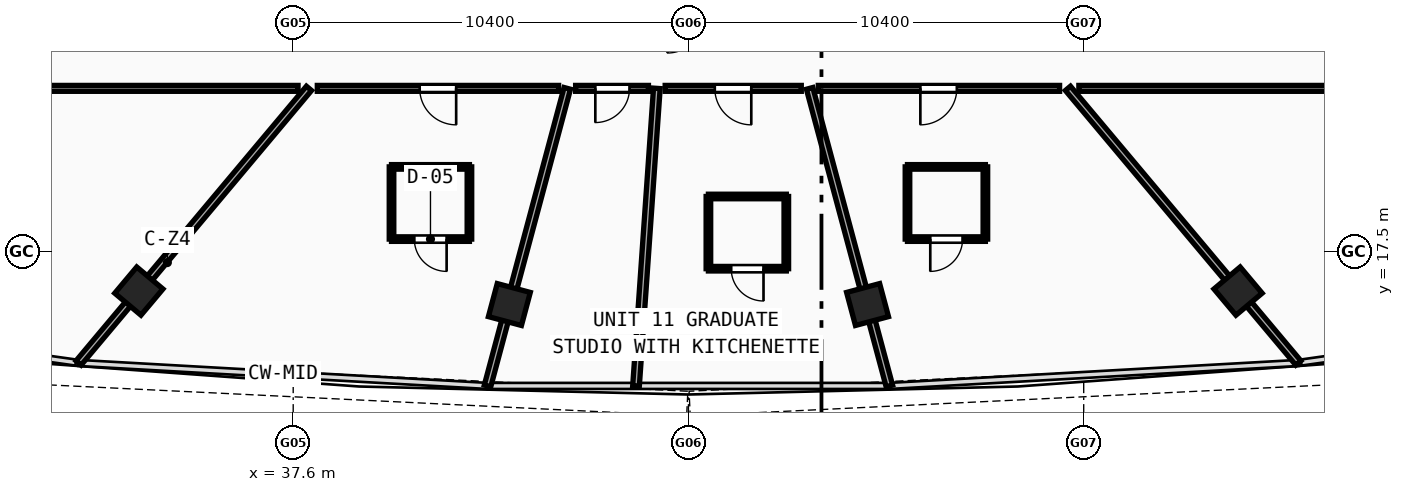
"""IFC4 building model, lengths in metres.
Left out: names, types, materials, properties, quantities, classifications, styles, units other than length and angle.
Written with IfcOpenShell. Run it as: python <this file> out.ifc"""

import sys

from ifc_helpers import new_model, si_unit, direction, frame, frame_2d, origin, origin_with_axes, origin_2d, place, context, subcontext, project, spatial, rectangle, hollow_rectangle, extrude, source, transform, mapped, element, fill, save


model = new_model("IFC4")
c1 = context("Model", 3, precision=1e-05, world=origin(), true_north=direction((0.0, 1.0)))
c2 = subcontext(c1, "Body", "Model", "MODEL_VIEW")
j1 = project(units=[si_unit("LENGTHUNIT", "METRE"), si_unit("PLANEANGLEUNIT", "RADIAN")], contexts=[c1])
p1 = place(None, origin())
s1 = spatial("IfcSite", under=j1, at=p1, CompositionType="ELEMENT")
p2 = place(p1, origin())
s2 = spatial("IfcBuilding", under=s1, at=p2, CompositionType="ELEMENT")
p3 = place(p2, frame((0.0, 0.0, 188.56)))
s3 = spatial("IfcBuildingStorey", under=s2, at=p3, CompositionType="ELEMENT", Elevation=188.56)
m1 = source(origin(), c2, "Body", "SweptSolid", [
    extrude(hollow_rectangle(XDim=0.9, YDim=0.9, WallThickness=0.036, at=origin_2d()), origin(), (0.0, 0.0, 1.0), 3.8),
])
for number, where, z_axis, x_axis in (
    (1, (33.539, 16.466, -0.26), (0.0, 0.0, 1.0), (0.766, -0.643, 0.0)),
    (2, (43.288, 16.112, -0.26), (0.0, 0.0, 1.0), (0.966, -0.259, 0.0)),
    (3, (52.713, 16.112, -0.26), (0.0, 0.0, 1.0), (0.966, 0.259, 0.0)),
    (4, (62.461, 16.466, -0.26), (0.0, 0.0, 1.0), (0.766, 0.643, 0.0)),
):
    element("IfcColumn", number, at=place(p3, frame(where, z_axis=z_axis, x_axis=x_axis)), inside=s3, PredefinedType="COLUMN", context=c2, shape_type="MappedRepresentation", body=[
        mapped(m1, transform((0.0, 0.0, 0.0), scale=1.0)),
    ])
p4 = place(p3, frame((38.015, 21.8, 0.0), z_axis=(0.0, 0.0, 1.0), x_axis=(-0.642777943688, -0.766052553751, 0.0)))
e5 = element("IfcWall", 5, at=p4, inside=s3, PredefinedType="PARTITIONING", context=c2, shape_type="SweptSolid", body=[
    extrude(rectangle(XDim=9.431, YDim=0.175, at=frame_2d((4.715, 0.0))), origin(), (0.0, 0.0, 1.0), 2.89),
])
p5 = place(p3, frame((44.811, 21.8, 0.0), z_axis=(0.0, 0.0, 1.0), x_axis=(-0.258815374981, -0.965926809688, 0.0)))
e6 = element("IfcWall", 6, at=p5, inside=s3, PredefinedType="PARTITIONING", context=c2, shape_type="SweptSolid", body=[
    extrude(rectangle(XDim=8.106, YDim=0.175, at=frame_2d((4.053, 0.0))), origin(), (0.0, 0.0, 1.0), 2.89),
])
p6 = place(p3, frame((47.168, 21.8, 0.0), z_axis=(0.0, 0.0, 1.0), x_axis=(-0.069770314737, -0.997563082307, 0.0)))
e7 = element("IfcWall", 7, at=p6, inside=s3, PredefinedType="PARTITIONING", context=c2, shape_type="SweptSolid", body=[
    extrude(rectangle(XDim=7.849, YDim=0.175, at=frame_2d((3.924, 0.0))), origin(), (0.0, 0.0, 1.0), 2.89),
])
p7 = place(p3, frame((51.189, 21.8, 0.0), z_axis=(0.0, 0.0, 1.0), x_axis=(0.258815374981, -0.965926809688, 0.0)))
e8 = element("IfcWall", 8, at=p7, inside=s3, PredefinedType="PARTITIONING", context=c2, shape_type="SweptSolid", body=[
    extrude(rectangle(XDim=8.106, YDim=0.175, at=frame_2d((4.053, 0.0))), origin(), (0.0, 0.0, 1.0), 2.89),
])
p8 = place(p3, frame((57.985, 21.8, 0.0), z_axis=(0.0, 0.0, 1.0), x_axis=(0.642777943688, -0.766052553751, 0.0)))
e9 = element("IfcWall", 9, at=p8, inside=s3, PredefinedType="PARTITIONING", context=c2, shape_type="SweptSolid", body=[
    extrude(rectangle(XDim=9.431, YDim=0.175, at=frame_2d((4.715, 0.0))), origin(), (0.0, 0.0, 1.0), 2.89),
])
p9 = place(p3, frame((66.4, 21.8, 0.0), z_axis=(0.0, 0.0, 1.0), x_axis=(-1.0, 0.0, 0.0)))
e10 = element("IfcWall", 10, at=p9, inside=s3, PredefinedType="PARTITIONING", context=c2, shape_type="SweptSolid", body=[
    extrude(rectangle(XDim=8.127, YDim=0.155, at=frame_2d((4.064, 0.0))), origin(), (0.0, 0.0, 1.0), 3.14),
])
p10 = place(p3, frame((57.765, 21.8, 0.0), z_axis=(0.0, 0.0, 1.0), x_axis=(-1.0, 0.0, 0.0)))
e11 = element("IfcWall", 11, at=p10, inside=s3, PredefinedType="PARTITIONING", context=c2, shape_type="SweptSolid", body=[
    extrude(rectangle(XDim=6.349, YDim=0.155, at=frame_2d((3.174, 0.0))), origin(), (0.0, 0.0, 1.0), 2.89),
])
p11 = place(p10, frame((2.703, 0.0, 0.0)))
e12 = element("IfcOpeningElement", 12, at=p11, cuts=e11, PredefinedType="OPENING", context=c2, shape_type="SweptSolid", body=[
    extrude(rectangle(XDim=0.96, YDim=2.12, at=frame_2d((0.48, 1.06))), frame((0.0, 0.087, 0.0), z_axis=(0.0, -1.0, 0.0), x_axis=(1.0, 0.0, 0.0)), (0.0, 0.0, 1.0), 0.175),
])
p12 = place(p3, frame((50.969, 21.8, 0.0), z_axis=(0.0, 0.0, 1.0), x_axis=(-1.0, 0.0, 0.0)))
e13 = element("IfcWall", 13, at=p12, inside=s3, PredefinedType="PARTITIONING", context=c2, shape_type="SweptSolid", body=[
    extrude(rectangle(XDim=3.581, YDim=0.155, at=frame_2d((1.791, 0.0))), origin(), (0.0, 0.0, 1.0), 3.54),
])
p13 = place(p12, frame((1.315, 0.0, 0.0)))
e14 = element("IfcOpeningElement", 14, at=p13, cuts=e13, PredefinedType="OPENING", context=c2, shape_type="SweptSolid", body=[
    extrude(rectangle(XDim=0.96, YDim=2.12, at=frame_2d((0.48, 1.06))), frame((0.0, 0.087, 0.0), z_axis=(0.0, -1.0, 0.0), x_axis=(1.0, 0.0, 0.0)), (0.0, 0.0, 1.0), 0.175),
])
p14 = place(p3, frame((46.948, 21.8, 0.0), z_axis=(0.0, 0.0, 1.0), x_axis=(-1.0, 0.0, 0.0)))
e15 = element("IfcWall", 15, at=p14, inside=s3, PredefinedType="PARTITIONING", context=c2, shape_type="SweptSolid", body=[
    extrude(rectangle(XDim=1.916, YDim=0.155, at=frame_2d((0.958, 0.0))), origin(), (0.0, 0.0, 1.0), 3.54),
])
p15 = place(p14, frame((0.498, 0.0, 0.0)))
e16 = element("IfcOpeningElement", 16, at=p15, cuts=e15, PredefinedType="OPENING", context=c2, shape_type="SweptSolid", body=[
    extrude(rectangle(XDim=0.9, YDim=2.08, at=frame_2d((0.45, 1.04))), frame((0.0, 0.087, 0.0), z_axis=(0.0, -1.0, 0.0), x_axis=(1.0, 0.0, 0.0)), (0.0, 0.0, 1.0), 0.175),
])
p16 = place(p3, frame((44.583, 21.8, 0.0), z_axis=(0.0, 0.0, 1.0), x_axis=(-1.0, 0.0, 0.0)))
e17 = element("IfcWall", 17, at=p16, inside=s3, PredefinedType="PARTITIONING", context=c2, shape_type="SweptSolid", body=[
    extrude(rectangle(XDim=6.349, YDim=0.155, at=frame_2d((3.174, 0.0))), origin(), (0.0, 0.0, 1.0), 2.89),
])
p17 = place(p16, frame((2.696, 0.0, 0.0)))
e18 = element("IfcOpeningElement", 18, at=p17, cuts=e17, PredefinedType="OPENING", context=c2, shape_type="SweptSolid", body=[
    extrude(rectangle(XDim=0.96, YDim=2.12, at=frame_2d((0.48, 1.06))), frame((0.0, 0.087, 0.0), z_axis=(0.0, -1.0, 0.0), x_axis=(1.0, 0.0, 0.0)), (0.0, 0.0, 1.0), 0.175),
])
p18 = place(p3, frame((37.728, 21.8, 0.0), z_axis=(0.0, 0.0, 1.0), x_axis=(-1.0, 0.0, 0.0)))
e19 = element("IfcWall", 19, at=p18, inside=s3, PredefinedType="PARTITIONING", context=c2, shape_type="SweptSolid", body=[
    extrude(rectangle(XDim=8.127, YDim=0.155, at=frame_2d((4.064, 0.0))), origin(), (0.0, 0.0, 1.0), 3.14),
])
p19 = place(p3, frame((40.187, 17.834, 0.0), z_axis=(0.0, 0.0, 1.0), x_axis=(1.0, 0.0, 0.0)))
e20 = element("IfcWall", 20, at=p19, inside=s3, PredefinedType="PARTITIONING", context=c2, shape_type="SweptSolid", body=[
    extrude(rectangle(XDim=2.05, YDim=0.12, at=frame_2d((1.025, 0.0))), origin(), (0.0, 0.0, 1.0), 3.54),
])
p20 = place(p19, frame((0.6, 0.0, 0.0)))
e21 = element("IfcOpeningElement", 21, at=p20, cuts=e20, PredefinedType="OPENING", context=c2, shape_type="SweptSolid", body=[
    extrude(rectangle(XDim=0.85, YDim=2.1, at=frame_2d((0.425, 1.05))), frame((0.0, 0.07, 0.0), z_axis=(0.0, -1.0, 0.0), x_axis=(1.0, 0.0, 0.0)), (0.0, 0.0, 1.0), 0.14),
])
p21 = place(p3, frame((42.237, 17.834, 0.0), z_axis=(0.0, 0.0, 1.0), x_axis=(0.0, 1.0, 0.0)))
e22 = element("IfcWall", 22, at=p21, inside=s3, PredefinedType="PARTITIONING", context=c2, shape_type="SweptSolid", body=[
    extrude(rectangle(XDim=1.9, YDim=0.12, at=frame_2d((0.95, 0.0))), origin(), (0.0, 0.0, 1.0), 3.14),
])
p22 = place(p3, frame((42.237, 19.734, 0.0), z_axis=(0.0, 0.0, 1.0), x_axis=(-1.0, 0.0, 0.0)))
e23 = element("IfcWall", 23, at=p22, inside=s3, PredefinedType="PARTITIONING", context=c2, shape_type="SweptSolid", body=[
    extrude(rectangle(XDim=2.05, YDim=0.12, at=frame_2d((1.025, 0.0))), origin(), (0.0, 0.0, 1.0), 3.14),
])
p23 = place(p3, frame((40.187, 19.734, 0.0), z_axis=(0.0, 0.0, 1.0), x_axis=(0.0, -1.0, 0.0)))
e24 = element("IfcWall", 24, at=p23, inside=s3, PredefinedType="PARTITIONING", context=c2, shape_type="SweptSolid", body=[
    extrude(rectangle(XDim=1.9, YDim=0.12, at=frame_2d((0.95, 0.0))), origin(), (0.0, 0.0, 1.0), 3.14),
])
p24 = place(p3, frame((48.525, 17.055, 0.0), z_axis=(0.0, 0.0, 1.0), x_axis=(1.0, 0.0, 0.0)))
e25 = element("IfcWall", 25, at=p24, inside=s3, PredefinedType="PARTITIONING", context=c2, shape_type="SweptSolid", body=[
    extrude(rectangle(XDim=2.05, YDim=0.12, at=frame_2d((1.025, 0.0))), origin(), (0.0, 0.0, 1.0), 3.54),
])
p25 = place(p24, frame((0.6, 0.0, 0.0)))
e26 = element("IfcOpeningElement", 26, at=p25, cuts=e25, PredefinedType="OPENING", context=c2, shape_type="SweptSolid", body=[
    extrude(rectangle(XDim=0.85, YDim=2.1, at=frame_2d((0.425, 1.05))), frame((0.0, 0.07, 0.0), z_axis=(0.0, -1.0, 0.0), x_axis=(1.0, 0.0, 0.0)), (0.0, 0.0, 1.0), 0.14),
])
p26 = place(p3, frame((50.575, 17.055, 0.0), z_axis=(0.0, 0.0, 1.0), x_axis=(0.0, 1.0, 0.0)))
e27 = element("IfcWall", 27, at=p26, inside=s3, PredefinedType="PARTITIONING", context=c2, shape_type="SweptSolid", body=[
    extrude(rectangle(XDim=1.9, YDim=0.12, at=frame_2d((0.95, 0.0))), origin(), (0.0, 0.0, 1.0), 3.54),
])
p27 = place(p3, frame((50.575, 18.955, 0.0), z_axis=(0.0, 0.0, 1.0), x_axis=(-1.0, 0.0, 0.0)))
e28 = element("IfcWall", 28, at=p27, inside=s3, PredefinedType="PARTITIONING", context=c2, shape_type="SweptSolid", body=[
    extrude(rectangle(XDim=2.05, YDim=0.12, at=frame_2d((1.025, 0.0))), origin(), (0.0, 0.0, 1.0), 3.54),
])
p28 = place(p3, frame((48.525, 18.955, 0.0), z_axis=(0.0, 0.0, 1.0), x_axis=(0.0, -1.0, 0.0)))
e29 = element("IfcWall", 29, at=p28, inside=s3, PredefinedType="PARTITIONING", context=c2, shape_type="SweptSolid", body=[
    extrude(rectangle(XDim=1.9, YDim=0.12, at=frame_2d((0.95, 0.0))), origin(), (0.0, 0.0, 1.0), 3.54),
])
p29 = place(p3, frame((53.763, 17.834, 0.0), z_axis=(0.0, 0.0, 1.0), x_axis=(1.0, 0.0, 0.0)))
e30 = element("IfcWall", 30, at=p29, inside=s3, PredefinedType="PARTITIONING", context=c2, shape_type="SweptSolid", body=[
    extrude(rectangle(XDim=2.05, YDim=0.12, at=frame_2d((1.025, 0.0))), origin(), (0.0, 0.0, 1.0), 3.54),
])
p30 = place(p29, frame((0.6, 0.0, 0.0)))
e31 = element("IfcOpeningElement", 31, at=p30, cuts=e30, PredefinedType="OPENING", context=c2, shape_type="SweptSolid", body=[
    extrude(rectangle(XDim=0.85, YDim=2.1, at=frame_2d((0.425, 1.05))), frame((0.0, 0.07, 0.0), z_axis=(0.0, -1.0, 0.0), x_axis=(1.0, 0.0, 0.0)), (0.0, 0.0, 1.0), 0.14),
])
p31 = place(p3, frame((55.813, 17.834, 0.0), z_axis=(0.0, 0.0, 1.0), x_axis=(0.0, 1.0, 0.0)))
e32 = element("IfcWall", 32, at=p31, inside=s3, PredefinedType="PARTITIONING", context=c2, shape_type="SweptSolid", body=[
    extrude(rectangle(XDim=1.9, YDim=0.12, at=frame_2d((0.95, 0.0))), origin(), (0.0, 0.0, 1.0), 3.14),
])
p32 = place(p3, frame((55.813, 19.734, 0.0), z_axis=(0.0, 0.0, 1.0), x_axis=(-1.0, 0.0, 0.0)))
e33 = element("IfcWall", 33, at=p32, inside=s3, PredefinedType="PARTITIONING", context=c2, shape_type="SweptSolid", body=[
    extrude(rectangle(XDim=2.05, YDim=0.12, at=frame_2d((1.025, 0.0))), origin(), (0.0, 0.0, 1.0), 3.14),
])
p33 = place(p3, frame((53.763, 19.734, 0.0), z_axis=(0.0, 0.0, 1.0), x_axis=(0.0, -1.0, 0.0)))
e34 = element("IfcWall", 34, at=p33, inside=s3, PredefinedType="PARTITIONING", context=c2, shape_type="SweptSolid", body=[
    extrude(rectangle(XDim=1.9, YDim=0.12, at=frame_2d((0.95, 0.0))), origin(), (0.0, 0.0, 1.0), 3.14),
])
m2 = source(origin(), c2, "Body", "SweptSolid", [
    extrude(rectangle(XDim=0.96, YDim=2.12, at=frame_2d((0.48, 1.06))), frame((0.0, 0.025, 0.0), z_axis=(0.0, -1.0, 0.0), x_axis=(1.0, 0.0, 0.0)), (0.0, 0.0, 1.0), 0.05),
])
p34 = place(p17, origin_with_axes())
e35 = element("IfcDoor", 35, at=p34, inside=s3, OperationType="SINGLE_SWING_LEFT", PredefinedType="DOOR", context=c2, shape_type="MappedRepresentation", body=[
    mapped(m2, transform((0.0, 0.0, 0.0), scale=1.0)),
])
fill(e18, e35)
m3 = source(origin(), c2, "Body", "SweptSolid", [
    extrude(rectangle(XDim=0.85, YDim=2.1, at=frame_2d((0.425, 1.05))), frame((0.0, 0.025, 0.0), z_axis=(0.0, -1.0, 0.0), x_axis=(1.0, 0.0, 0.0)), (0.0, 0.0, 1.0), 0.05),
])
p35 = place(p20, frame((0.85, 0.0, 0.0), z_axis=(0.0, 0.0, 1.0), x_axis=(-1.0, 0.0, 0.0)))
e36 = element("IfcDoor", 36, at=p35, inside=s3, OperationType="SINGLE_SWING_LEFT", PredefinedType="DOOR", context=c2, shape_type="MappedRepresentation", body=[
    mapped(m3, transform((0.0, 0.0, 0.0), scale=1.0)),
])
fill(e21, e36)
m4 = source(origin(), c2, "Body", "SweptSolid", [
    extrude(rectangle(XDim=0.9, YDim=2.08, at=frame_2d((0.45, 1.04))), frame((0.0, 0.025, 0.0), z_axis=(0.0, -1.0, 0.0), x_axis=(1.0, 0.0, 0.0)), (0.0, 0.0, 1.0), 0.05),
])
p36 = place(p15, origin_with_axes())
e37 = element("IfcDoor", 37, at=p36, inside=s3, OperationType="SINGLE_SWING_RIGHT", PredefinedType="DOOR", context=c2, shape_type="MappedRepresentation", body=[
    mapped(m4, transform((0.0, 0.0, 0.0), scale=1.0)),
])
fill(e16, e37)
p37 = place(p13, origin_with_axes())
e38 = element("IfcDoor", 38, at=p37, inside=s3, OperationType="SINGLE_SWING_LEFT", PredefinedType="DOOR", context=c2, shape_type="MappedRepresentation", body=[
    mapped(m2, transform((0.0, 0.0, 0.0), scale=1.0)),
])
fill(e14, e38)
p38 = place(p25, frame((0.85, 0.0, 0.0), z_axis=(0.0, 0.0, 1.0), x_axis=(-1.0, 0.0, 0.0)))
e39 = element("IfcDoor", 39, at=p38, inside=s3, OperationType="SINGLE_SWING_LEFT", PredefinedType="DOOR", context=c2, shape_type="MappedRepresentation", body=[
    mapped(m3, transform((0.0, 0.0, 0.0), scale=1.0)),
])
fill(e26, e39)
p39 = place(p11, origin_with_axes())
e40 = element("IfcDoor", 40, at=p39, inside=s3, OperationType="SINGLE_SWING_RIGHT", PredefinedType="DOOR", context=c2, shape_type="MappedRepresentation", body=[
    mapped(m2, transform((0.0, 0.0, 0.0), scale=1.0)),
])
fill(e12, e40)
p40 = place(p30, frame((0.85, 0.0, 0.0), z_axis=(0.0, 0.0, 1.0), x_axis=(-1.0, 0.0, 0.0)))
e41 = element("IfcDoor", 41, at=p40, inside=s3, OperationType="SINGLE_SWING_RIGHT", PredefinedType="DOOR", context=c2, shape_type="MappedRepresentation", body=[
    mapped(m3, transform((0.0, 0.0, 0.0), scale=1.0)),
])
fill(e31, e41)
save(model, sys.argv[1])
